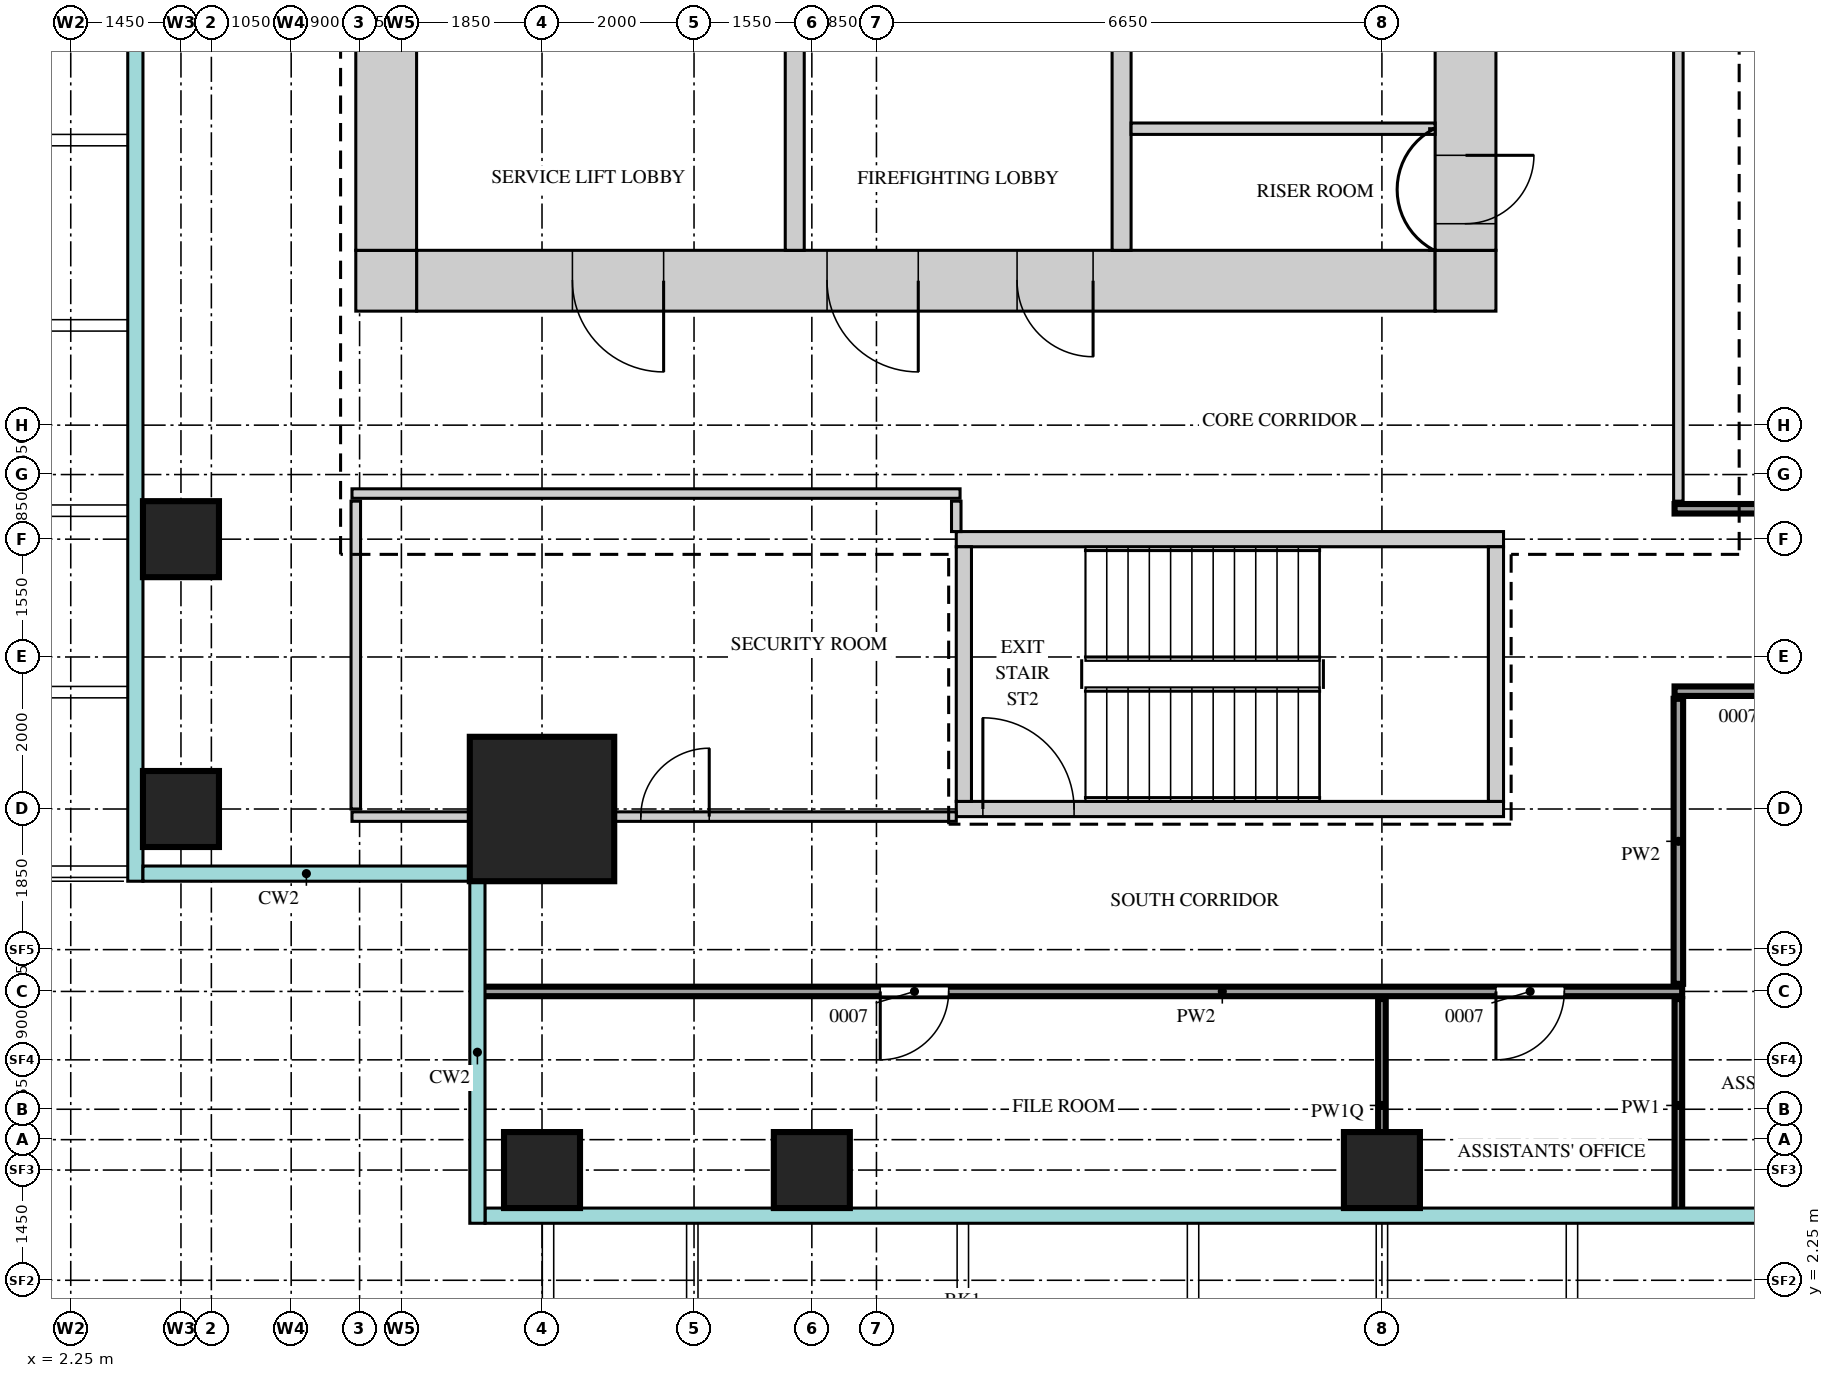
"""IFC4 building model, lengths in metres.
Left out: names, types, materials, properties, quantities, classifications, styles, units other than length and angle.
Written with IfcOpenShell. Run it as: python <this file> out.ifc"""

import sys

from ifc_helpers import new_model, si_unit, direction, frame, frame_2d, origin, origin_2d, place, context, subcontext, project, spatial, rectangle, extrude, source, transform, mapped, element, fill, save


model = new_model("IFC4")
c1 = context("Model", 3, precision=1e-05, world=origin(), true_north=direction((0.0, 1.0)))
c2 = subcontext(c1, "Body", "Model", "MODEL_VIEW")
j1 = project(units=[si_unit("LENGTHUNIT", "METRE"), si_unit("PLANEANGLEUNIT", "RADIAN")], contexts=[c1])
p1 = place(None, origin())
s1 = spatial("IfcSite", under=j1, at=p1, CompositionType="ELEMENT")
p2 = place(p1, origin())
s2 = spatial("IfcBuilding", under=s1, at=p2, CompositionType="ELEMENT")
p3 = place(p2, frame((0.0, 0.0, 200.7)))
s3 = spatial("IfcBuildingStorey", under=s2, at=p3, CompositionType="ELEMENT", Elevation=200.7)
m1 = source(origin(), c2, "Body", "SweptSolid", [
    extrude(rectangle(XDim=13.4, YDim=0.8, at=frame_2d((6.7, 0.0))), origin(), (0.0, 0.0, 1.0), 3.75),
])
p4 = place(p3, frame((6.8, 15.4, 0.0), z_axis=(0.0, 0.0, 1.0), x_axis=(1.0, 0.0, 0.0)))
e1 = element("IfcWall", 1, at=p4, inside=s3, PredefinedType="SHEAR", context=c2, shape_type="MappedRepresentation", body=[
    mapped(m1, transform((0.0, 0.0, 0.0))),
])
m2 = source(origin(), c2, "Body", "SweptSolid", [
    extrude(rectangle(XDim=1.2, YDim=2.1, at=frame_2d((0.6, 1.05))), frame((0.0, 0.41, 0.0), z_axis=(0.0, -1.0, 0.0), x_axis=(1.0, 0.0, 0.0)), (0.0, 0.0, 1.0), 0.82),
])
p5 = place(p4, frame((5.4, 0.0, 0.0)))
e2 = element("IfcOpeningElement", 2, at=p5, cuts=e1, PredefinedType="OPENING", context=c2, shape_type="MappedRepresentation", body=[
    mapped(m2, transform((0.0, 0.0, 0.0))),
])
p6 = place(p4, frame((2.05, 0.0, 0.0)))
e3 = element("IfcOpeningElement", 3, at=p6, cuts=e1, PredefinedType="OPENING", context=c2, shape_type="MappedRepresentation", body=[
    mapped(m2, transform((0.0, 0.0, 0.0))),
])
m3 = source(origin(), c2, "Body", "SweptSolid", [
    extrude(rectangle(XDim=1.0, YDim=2.1, at=frame_2d((0.5, 1.05))), frame((0.0, 0.41, 0.0), z_axis=(0.0, -1.0, 0.0), x_axis=(1.0, 0.0, 0.0)), (0.0, 0.0, 1.0), 0.82),
])
p7 = place(p4, frame((7.9, 0.0, 0.0)))
e4 = element("IfcOpeningElement", 4, at=p7, cuts=e1, PredefinedType="OPENING", context=c2, shape_type="MappedRepresentation", body=[
    mapped(m3, transform((0.0, 0.0, 0.0))),
])
m4 = source(origin(), c2, "Body", "SweptSolid", [
    extrude(rectangle(XDim=0.8, YDim=0.8, at=frame_2d((0.4, 0.0))), origin(), (0.0, 0.0, 1.0), 3.75),
])
for number, where, z_axis, x_axis in (
    (5, (20.2, 15.4, 0.0), (0.0, 0.0, 1.0), (1.0, 0.0, 0.0)),
    (6, (6.0, 15.4, 0.0), (0.0, 0.0, 1.0), (1.0, 0.0, 0.0)),
):
    element("IfcWall", number, at=place(p3, frame(where, z_axis=z_axis, x_axis=x_axis)), inside=s3, PredefinedType="SHEAR", context=c2, shape_type="MappedRepresentation", body=[
        mapped(m4, transform((0.0, 0.0, 0.0))),
    ])
m5 = source(origin(), c2, "Body", "SweptSolid", [
    extrude(rectangle(XDim=22.4, YDim=0.8, at=frame_2d((11.2, 0.0))), origin(), (0.0, 0.0, 1.0), 3.75),
])
p8 = place(p3, frame((20.6, 15.8, 0.0), z_axis=(0.0, 0.0, 1.0), x_axis=(0.0, 1.0, 0.0)))
e7 = element("IfcWall", 7, at=p8, inside=s3, PredefinedType="SHEAR", context=c2, shape_type="MappedRepresentation", body=[
    mapped(m5, transform((0.0, 0.0, 0.0))),
])
m6 = source(origin(), c2, "Body", "SweptSolid", [
    extrude(rectangle(XDim=1.8, YDim=2.1, at=frame_2d((0.9, 1.05))), frame((0.0, 0.41, 0.0), z_axis=(0.0, -1.0, 0.0), x_axis=(1.0, 0.0, 0.0)), (0.0, 0.0, 1.0), 0.82),
])
p9 = place(p8, frame((10.7, 0.0, 0.0)))
e8 = element("IfcOpeningElement", 8, at=p9, cuts=e7, PredefinedType="OPENING", context=c2, shape_type="MappedRepresentation", body=[
    mapped(m6, transform((0.0, 0.0, 0.0))),
])
m7 = source(origin(), c2, "Body", "SweptSolid", [
    extrude(rectangle(XDim=0.9, YDim=2.1, at=frame_2d((0.45, 1.05))), frame((0.0, 0.41, 0.0), z_axis=(0.0, -1.0, 0.0), x_axis=(1.0, 0.0, 0.0)), (0.0, 0.0, 1.0), 0.82),
])
p10 = place(p8, frame((0.35, 0.0, 0.0)))
e9 = element("IfcOpeningElement", 9, at=p10, cuts=e7, PredefinedType="OPENING", context=c2, shape_type="MappedRepresentation", body=[
    mapped(m7, transform((0.0, 0.0, 0.0))),
])
p11 = place(p8, frame((2.8, 0.0, 0.0)))
e10 = element("IfcOpeningElement", 10, at=p11, cuts=e7, PredefinedType="OPENING", context=c2, shape_type="MappedRepresentation", body=[
    mapped(m7, transform((0.0, 0.0, 0.0))),
])
p12 = place(p8, frame((5.5, 0.0, 0.0)))
e11 = element("IfcOpeningElement", 11, at=p12, cuts=e7, PredefinedType="OPENING", context=c2, shape_type="MappedRepresentation", body=[
    mapped(m3, transform((0.0, 0.0, 0.0))),
])
p13 = place(p3, frame((6.4, 15.8, 0.0), z_axis=(0.0, 0.0, 1.0), x_axis=(0.0, 1.0, 0.0)))
e12 = element("IfcWall", 12, at=p13, inside=s3, PredefinedType="SHEAR", context=c2, shape_type="MappedRepresentation", body=[
    mapped(m5, transform((0.0, 0.0, 0.0))),
])
m8 = source(origin(), c2, "Body", "SweptSolid", [
    extrude(rectangle(XDim=7.2, YDim=0.2, at=frame_2d((3.6, 0.0))), origin(), (0.0, 0.0, 1.0), 3.75),
])
p14 = place(p3, frame((13.9, 12.0, 0.0), z_axis=(0.0, 0.0, 1.0), x_axis=(1.0, 0.0, 0.0)))
e13 = element("IfcWall", 13, at=p14, inside=s3, PredefinedType="SHEAR", context=c2, shape_type="MappedRepresentation", body=[
    mapped(m8, transform((0.0, 0.0, 0.0))),
])
p15 = place(p3, frame((13.9, 8.45, 0.0), z_axis=(0.0, 0.0, 1.0), x_axis=(1.0, 0.0, 0.0)))
e14 = element("IfcWall", 14, at=p15, inside=s3, PredefinedType="SHEAR", context=c2, shape_type="MappedRepresentation", body=[
    mapped(m8, transform((0.0, 0.0, 0.0))),
])
m9 = source(origin(), c2, "Body", "SweptSolid", [
    extrude(rectangle(XDim=1.2, YDim=2.1, at=frame_2d((0.6, 1.05))), frame((0.0, 0.11, 0.0), z_axis=(0.0, -1.0, 0.0), x_axis=(1.0, 0.0, 0.0)), (0.0, 0.0, 1.0), 0.22),
])
p16 = place(p15, frame((0.35, 0.0, 0.0)))
e15 = element("IfcOpeningElement", 15, at=p16, cuts=e14, PredefinedType="OPENING", context=c2, shape_type="MappedRepresentation", body=[
    mapped(m9, transform((0.0, 0.0, 0.0))),
])
m10 = source(origin(), c2, "Body", "SweptSolid", [
    extrude(rectangle(XDim=3.35, YDim=0.2, at=frame_2d((1.675, 0.0))), origin(), (0.0, 0.0, 1.0), 3.75),
])
for number, where, z_axis, x_axis in (
    (16, (21.0, 8.55, 0.0), (0.0, 0.0, 1.0), (0.0, 1.0, 0.0)),
    (17, (14.0, 8.55, 0.0), (0.0, 0.0, 1.0), (0.0, 1.0, 0.0)),
):
    element("IfcWall", number, at=place(p3, frame(where, z_axis=z_axis, x_axis=x_axis)), inside=s3, PredefinedType="SHEAR", context=c2, shape_type="MappedRepresentation", body=[
        mapped(m10, transform((0.0, 0.0, 0.0))),
    ])
m11 = source(origin(), c2, "Body", "SweptSolid", [
    extrude(rectangle(XDim=3.4, YDim=0.25, at=frame_2d((1.7, 0.0))), origin(), (0.0, 0.0, 1.0), 3.75),
])
for number, where, z_axis, x_axis in (
    (18, (16.075, 15.8, 0.0), (0.0, 0.0, 1.0), (0.0, 1.0, 0.0)),
    (19, (11.775, 15.8, 0.0), (0.0, 0.0, 1.0), (0.0, 1.0, 0.0)),
):
    element("IfcWall", number, at=place(p3, frame(where, z_axis=z_axis, x_axis=x_axis)), inside=s3, PredefinedType="STANDARD", context=c2, shape_type="MappedRepresentation", body=[
        mapped(m11, transform((0.0, 0.0, 0.0))),
    ])
m12 = source(origin(), c2, "Body", "SweptSolid", [
    extrude(rectangle(XDim=1.9, YDim=1.9, at=origin_2d()), origin(), (0.0, 0.0, 1.0), 4.0),
])
p17 = place(p3, frame((8.45, 8.45, 0.0), z_axis=(0.0, 0.0, 1.0), x_axis=(1.0, 0.0, 0.0)))
e20 = element("IfcColumn", 20, at=p17, inside=s3, PredefinedType="COLUMN", context=c2, shape_type="MappedRepresentation", body=[
    mapped(m12, transform((0.0, 0.0, 0.0))),
])
m13 = source(origin(), c2, "Body", "SweptSolid", [
    extrude(rectangle(XDim=1.0, YDim=1.0, at=origin_2d()), origin(), (0.0, 0.0, 1.0), 3.75),
])
for number, where, z_axis, x_axis in (
    (21, (8.45, 3.7, 0.0), (0.0, 0.0, 1.0), (1.0, 0.0, 0.0)),
    (22, (12.0, 3.7, 0.0), (0.0, 0.0, 1.0), (1.0, 0.0, 0.0)),
    (23, (19.5, 3.7, 0.0), (0.0, 0.0, 1.0), (1.0, 0.0, 0.0)),
    (24, (3.7, 8.45, 0.0), (0.0, 0.0, 1.0), (1.0, 0.0, 0.0)),
    (25, (3.7, 12.0, 0.0), (0.0, 0.0, 1.0), (1.0, 0.0, 0.0)),
):
    element("IfcColumn", number, at=place(p3, frame(where, z_axis=z_axis, x_axis=x_axis)), inside=s3, PredefinedType="COLUMN", context=c2, shape_type="MappedRepresentation", body=[
        mapped(m13, transform((0.0, 0.0, 0.0))),
    ])
m14 = source(origin(), c2, "Body", "SweptSolid", [
    extrude(rectangle(XDim=2.8, YDim=0.1, at=frame_2d((1.4, 0.0))), origin(), (0.0, 0.0, 1.0), 3.42),
])
p18 = place(p3, frame((19.5, 3.15, 0.0), z_axis=(0.0, 0.0, 1.0), x_axis=(0.0, 1.0, 0.0)))
e26 = element("IfcWall", 26, at=p18, inside=s3, PredefinedType="PARTITIONING", context=c2, shape_type="MappedRepresentation", body=[
    mapped(m14, transform((0.0, 0.0, 0.0))),
])
m15 = source(origin(), c2, "Body", "SweptSolid", [
    extrude(rectangle(XDim=2.8, YDim=0.1, at=frame_2d((1.4, 0.0))), origin(), (0.0, 0.0, 1.0), 3.8),
])
p19 = place(p3, frame((23.4, 3.15, 0.0), z_axis=(0.0, 0.0, 1.0), x_axis=(0.0, 1.0, 0.0)))
e27 = element("IfcWall", 27, at=p19, inside=s3, PredefinedType="PARTITIONING", context=c2, shape_type="MappedRepresentation", body=[
    mapped(m15, transform((0.0, 0.0, 0.0))),
])
m16 = source(origin(), c2, "Body", "SweptSolid", [
    extrude(rectangle(XDim=15.8, YDim=0.125, at=frame_2d((7.9, 0.0))), origin(), (0.0, 0.0, 1.0), 3.8),
])
p20 = place(p3, frame((7.65, 6.05, 0.0), z_axis=(0.0, 0.0, 1.0), x_axis=(1.0, 0.0, 0.0)))
e28 = element("IfcWall", 28, at=p20, inside=s3, PredefinedType="PARTITIONING", context=c2, shape_type="MappedRepresentation", body=[
    mapped(m16, transform((0.0, 0.0, 0.0))),
])
m17 = source(origin(), c2, "Body", "SweptSolid", [
    extrude(rectangle(XDim=0.9, YDim=2.1, at=frame_2d((0.45, 1.05))), frame((0.0, 0.073, 0.0), z_axis=(0.0, -1.0, 0.0), x_axis=(1.0, 0.0, 0.0)), (0.0, 0.0, 1.0), 0.145),
])
p21 = place(p20, frame((5.25, 0.0, 0.0)))
e29 = element("IfcOpeningElement", 29, at=p21, cuts=e28, PredefinedType="OPENING", context=c2, shape_type="MappedRepresentation", body=[
    mapped(m17, transform((0.0, 0.0, 0.0))),
])
p22 = place(p20, frame((13.35, 0.0, 0.0)))
e30 = element("IfcOpeningElement", 30, at=p22, cuts=e28, PredefinedType="OPENING", context=c2, shape_type="MappedRepresentation", body=[
    mapped(m17, transform((0.0, 0.0, 0.0))),
])
m18 = source(origin(), c2, "Body", "SweptSolid", [
    extrude(rectangle(XDim=3.75, YDim=0.125, at=frame_2d((1.875, 0.0))), origin(), (0.0, 0.0, 1.0), 3.8),
])
p23 = place(p3, frame((23.4, 6.15, 0.0), z_axis=(0.0, 0.0, 1.0), x_axis=(0.0, 1.0, 0.0)))
e31 = element("IfcWall", 31, at=p23, inside=s3, PredefinedType="PARTITIONING", context=c2, shape_type="MappedRepresentation", body=[
    mapped(m18, transform((0.0, 0.0, 0.0))),
])
m19 = source(origin(), c2, "Body", "SweptSolid", [
    extrude(rectangle(XDim=7.95, YDim=0.125, at=frame_2d((3.975, 0.0))), origin(), (0.0, 0.0, 1.0), 3.25),
])
p24 = place(p3, frame((5.95, 8.35, 0.0), z_axis=(0.0, 0.0, 1.0), x_axis=(1.0, 0.0, 0.0)))
e32 = element("IfcWall", 32, at=p24, inside=s3, PredefinedType="PARTITIONING", context=c2, shape_type="MappedRepresentation", body=[
    mapped(m19, transform((0.0, 0.0, 0.0))),
])
p25 = place(p24, frame((3.8, 0.0, 0.0)))
e33 = element("IfcOpeningElement", 33, at=p25, cuts=e32, PredefinedType="OPENING", context=c2, shape_type="MappedRepresentation", body=[
    mapped(m17, transform((0.0, 0.0, 0.0))),
])
m20 = source(origin(), c2, "Body", "SweptSolid", [
    extrude(rectangle(XDim=4.05, YDim=0.125, at=frame_2d((2.025, 0.0))), origin(), (0.0, 0.0, 1.0), 3.8),
])
p26 = place(p3, frame((6.0, 8.45, 0.0), z_axis=(0.0, 0.0, 1.0), x_axis=(0.0, 1.0, 0.0)))
e34 = element("IfcWall", 34, at=p26, inside=s3, PredefinedType="PARTITIONING", context=c2, shape_type="MappedRepresentation", body=[
    mapped(m20, transform((0.0, 0.0, 0.0))),
])
m21 = source(origin(), c2, "Body", "SweptSolid", [
    extrude(rectangle(XDim=20.6, YDim=0.125, at=frame_2d((10.3, 0.0))), origin(), (0.0, 0.0, 1.0), 3.8),
])
p27 = place(p3, frame((23.35, 10.0, 0.0), z_axis=(0.0, 0.0, 1.0), x_axis=(1.0, 0.0, 0.0)))
e35 = element("IfcWall", 35, at=p27, inside=s3, PredefinedType="PARTITIONING", context=c2, shape_type="MappedRepresentation", body=[
    mapped(m21, transform((0.0, 0.0, 0.0))),
])
p28 = place(p27, frame((1.25, 0.0, 0.0)))
e36 = element("IfcOpeningElement", 36, at=p28, cuts=e35, PredefinedType="OPENING", context=c2, shape_type="MappedRepresentation", body=[
    mapped(m17, transform((0.0, 0.0, 0.0))),
])
p29 = place(p27, frame((10.55, 0.0, 0.0)))
e37 = element("IfcOpeningElement", 37, at=p29, cuts=e35, PredefinedType="OPENING", context=c2, shape_type="MappedRepresentation", body=[
    mapped(m17, transform((0.0, 0.0, 0.0))),
])
p30 = place(p27, frame((19.05, 0.0, 0.0)))
e38 = element("IfcOpeningElement", 38, at=p30, cuts=e35, PredefinedType="OPENING", context=c2, shape_type="MappedRepresentation", body=[
    mapped(m17, transform((0.0, 0.0, 0.0))),
])
m22 = source(origin(), c2, "Body", "SweptSolid", [
    extrude(rectangle(XDim=0.4, YDim=0.125, at=frame_2d((0.2, 0.0))), origin(), (0.0, 0.0, 1.0), 3.8),
])
p31 = place(p3, frame((13.9, 12.1, 0.0), z_axis=(0.0, 0.0, 1.0), x_axis=(0.0, 1.0, 0.0)))
e39 = element("IfcWall", 39, at=p31, inside=s3, PredefinedType="PARTITIONING", context=c2, shape_type="MappedRepresentation", body=[
    mapped(m22, transform((0.0, 0.0, 0.0))),
])
m23 = source(origin(), c2, "Body", "SweptSolid", [
    extrude(rectangle(XDim=18.3, YDim=0.125, at=frame_2d((9.15, 0.0))), origin(), (0.0, 0.0, 1.0), 3.8),
])
p32 = place(p3, frame((23.35, 12.4, 0.0), z_axis=(0.0, 0.0, 1.0), x_axis=(1.0, 0.0, 0.0)))
e40 = element("IfcWall", 40, at=p32, inside=s3, PredefinedType="PARTITIONING", context=c2, shape_type="MappedRepresentation", body=[
    mapped(m23, transform((0.0, 0.0, 0.0))),
])
m24 = source(origin(), c2, "Body", "SweptSolid", [
    extrude(rectangle(XDim=23.4, YDim=0.125, at=frame_2d((11.7, 0.0))), origin(), (0.0, 0.0, 1.0), 3.8),
])
p33 = place(p3, frame((23.4, 12.5, 0.0), z_axis=(0.0, 0.0, 1.0), x_axis=(0.0, 1.0, 0.0)))
e41 = element("IfcWall", 41, at=p33, inside=s3, PredefinedType="PARTITIONING", context=c2, shape_type="MappedRepresentation", body=[
    mapped(m24, transform((0.0, 0.0, 0.0))),
])
m25 = source(origin(), c2, "Body", "SweptSolid", [
    extrude(rectangle(XDim=1.2, YDim=2.1, at=frame_2d((0.6, 1.05))), frame((0.0, 0.073, 0.0), z_axis=(0.0, -1.0, 0.0), x_axis=(1.0, 0.0, 0.0)), (0.0, 0.0, 1.0), 0.145),
])
p34 = place(p33, frame((11.1, 0.0, 0.0)))
e42 = element("IfcOpeningElement", 42, at=p34, cuts=e41, PredefinedType="OPENING", context=c2, shape_type="MappedRepresentation", body=[
    mapped(m25, transform((0.0, 0.0, 0.0))),
])
m26 = source(origin(), c2, "Body", "SweptSolid", [
    extrude(rectangle(XDim=8.0, YDim=0.125, at=frame_2d((4.0, 0.0))), origin(), (0.0, 0.0, 1.0), 3.8),
])
p35 = place(p3, frame((5.95, 12.6, 0.0), z_axis=(0.0, 0.0, 1.0), x_axis=(1.0, 0.0, 0.0)))
e43 = element("IfcWall", 43, at=p35, inside=s3, PredefinedType="PARTITIONING", context=c2, shape_type="MappedRepresentation", body=[
    mapped(m26, transform((0.0, 0.0, 0.0))),
])
m27 = source(origin(), c2, "Body", "SweptSolid", [
    extrude(rectangle(XDim=4.0, YDim=0.15, at=frame_2d((2.0, 0.0))), origin(), (0.0, 0.0, 1.0), 3.8),
])
p36 = place(p3, frame((16.2, 17.4, 0.0), z_axis=(0.0, 0.0, 1.0), x_axis=(1.0, 0.0, 0.0)))
e44 = element("IfcWall", 44, at=p36, inside=s3, PredefinedType="PARTITIONING", context=c2, shape_type="MappedRepresentation", body=[
    mapped(m27, transform((0.0, 0.0, 0.0))),
])
m28 = source(origin(), c2, "Body", "SweptSolid", [
    extrude(rectangle(XDim=0.9, YDim=2.1, at=frame_2d((0.45, 1.05))), frame((0.0, 0.35, 0.0), z_axis=(0.0, -1.0, 0.0), x_axis=(1.0, 0.0, 0.0)), (0.0, 0.0, 1.0), 0.7),
])
p37 = place(p10, origin())
e45 = element("IfcDoor", 45, at=p37, inside=s3, OperationType="SINGLE_SWING_RIGHT", PredefinedType="DOOR", context=c2, shape_type="MappedRepresentation", body=[
    mapped(m28, transform((0.0, 0.0, 0.0))),
])
fill(e9, e45)
m29 = source(origin(), c2, "Body", "SweptSolid", [
    extrude(rectangle(XDim=1.2, YDim=2.1, at=frame_2d((0.6, 1.05))), frame((0.0, 0.35, 0.0), z_axis=(0.0, -1.0, 0.0), x_axis=(1.0, 0.0, 0.0)), (0.0, 0.0, 1.0), 0.7),
])
p38 = place(p5, origin())
e46 = element("IfcDoor", 46, at=p38, inside=s3, OperationType="SINGLE_SWING_RIGHT", PredefinedType="DOOR", context=c2, shape_type="MappedRepresentation", body=[
    mapped(m29, transform((0.0, 0.0, 0.0))),
])
fill(e2, e46)
p39 = place(p6, origin())
e47 = element("IfcDoor", 47, at=p39, inside=s3, OperationType="SINGLE_SWING_RIGHT", PredefinedType="DOOR", context=c2, shape_type="MappedRepresentation", body=[
    mapped(m29, transform((0.0, 0.0, 0.0))),
])
fill(e3, e47)
m30 = source(origin(), c2, "Body", "SweptSolid", [
    extrude(rectangle(XDim=1.0, YDim=2.1, at=frame_2d((0.5, 1.05))), frame((0.0, 0.35, 0.0), z_axis=(0.0, -1.0, 0.0), x_axis=(1.0, 0.0, 0.0)), (0.0, 0.0, 1.0), 0.7),
])
p40 = place(p7, origin())
e48 = element("IfcDoor", 48, at=p40, inside=s3, OperationType="SINGLE_SWING_RIGHT", PredefinedType="DOOR", context=c2, shape_type="MappedRepresentation", body=[
    mapped(m30, transform((0.0, 0.0, 0.0))),
])
fill(e4, e48)
m31 = source(origin(), c2, "Body", "SweptSolid", [
    extrude(rectangle(XDim=0.9, YDim=2.1, at=frame_2d((0.45, 1.05))), frame((0.0, 0.025, 0.0), z_axis=(0.0, -1.0, 0.0), x_axis=(1.0, 0.0, 0.0)), (0.0, 0.0, 1.0), 0.05),
])
p41 = place(p25, origin())
e49 = element("IfcDoor", 49, at=p41, inside=s3, OperationType="SINGLE_SWING_LEFT", PredefinedType="DOOR", context=c2, shape_type="MappedRepresentation", body=[
    mapped(m31, transform((0.0, 0.0, 0.0))),
])
fill(e33, e49)
p42 = place(p21, origin())
e50 = element("IfcDoor", 50, at=p42, inside=s3, OperationType="SINGLE_SWING_LEFT", PredefinedType="DOOR", context=c2, shape_type="MappedRepresentation", body=[
    mapped(m31, transform((0.0, 0.0, 0.0))),
])
fill(e29, e50)
p43 = place(p22, origin())
e51 = element("IfcDoor", 51, at=p43, inside=s3, OperationType="SINGLE_SWING_LEFT", PredefinedType="DOOR", context=c2, shape_type="MappedRepresentation", body=[
    mapped(m31, transform((0.0, 0.0, 0.0))),
])
fill(e30, e51)
m32 = source(origin(), c2, "Body", "SweptSolid", [
    extrude(rectangle(XDim=1.2, YDim=2.1, at=frame_2d((0.6, 1.05))), frame((0.0, 0.025, 0.0), z_axis=(0.0, -1.0, 0.0), x_axis=(1.0, 0.0, 0.0)), (0.0, 0.0, 1.0), 0.05),
])
p44 = place(p16, origin())
e52 = element("IfcDoor", 52, at=p44, inside=s3, OperationType="SINGLE_SWING_RIGHT", PredefinedType="DOOR", context=c2, shape_type="MappedRepresentation", body=[
    mapped(m32, transform((0.0, 0.0, 0.0))),
])
fill(e15, e52)
save(model, sys.argv[1])
